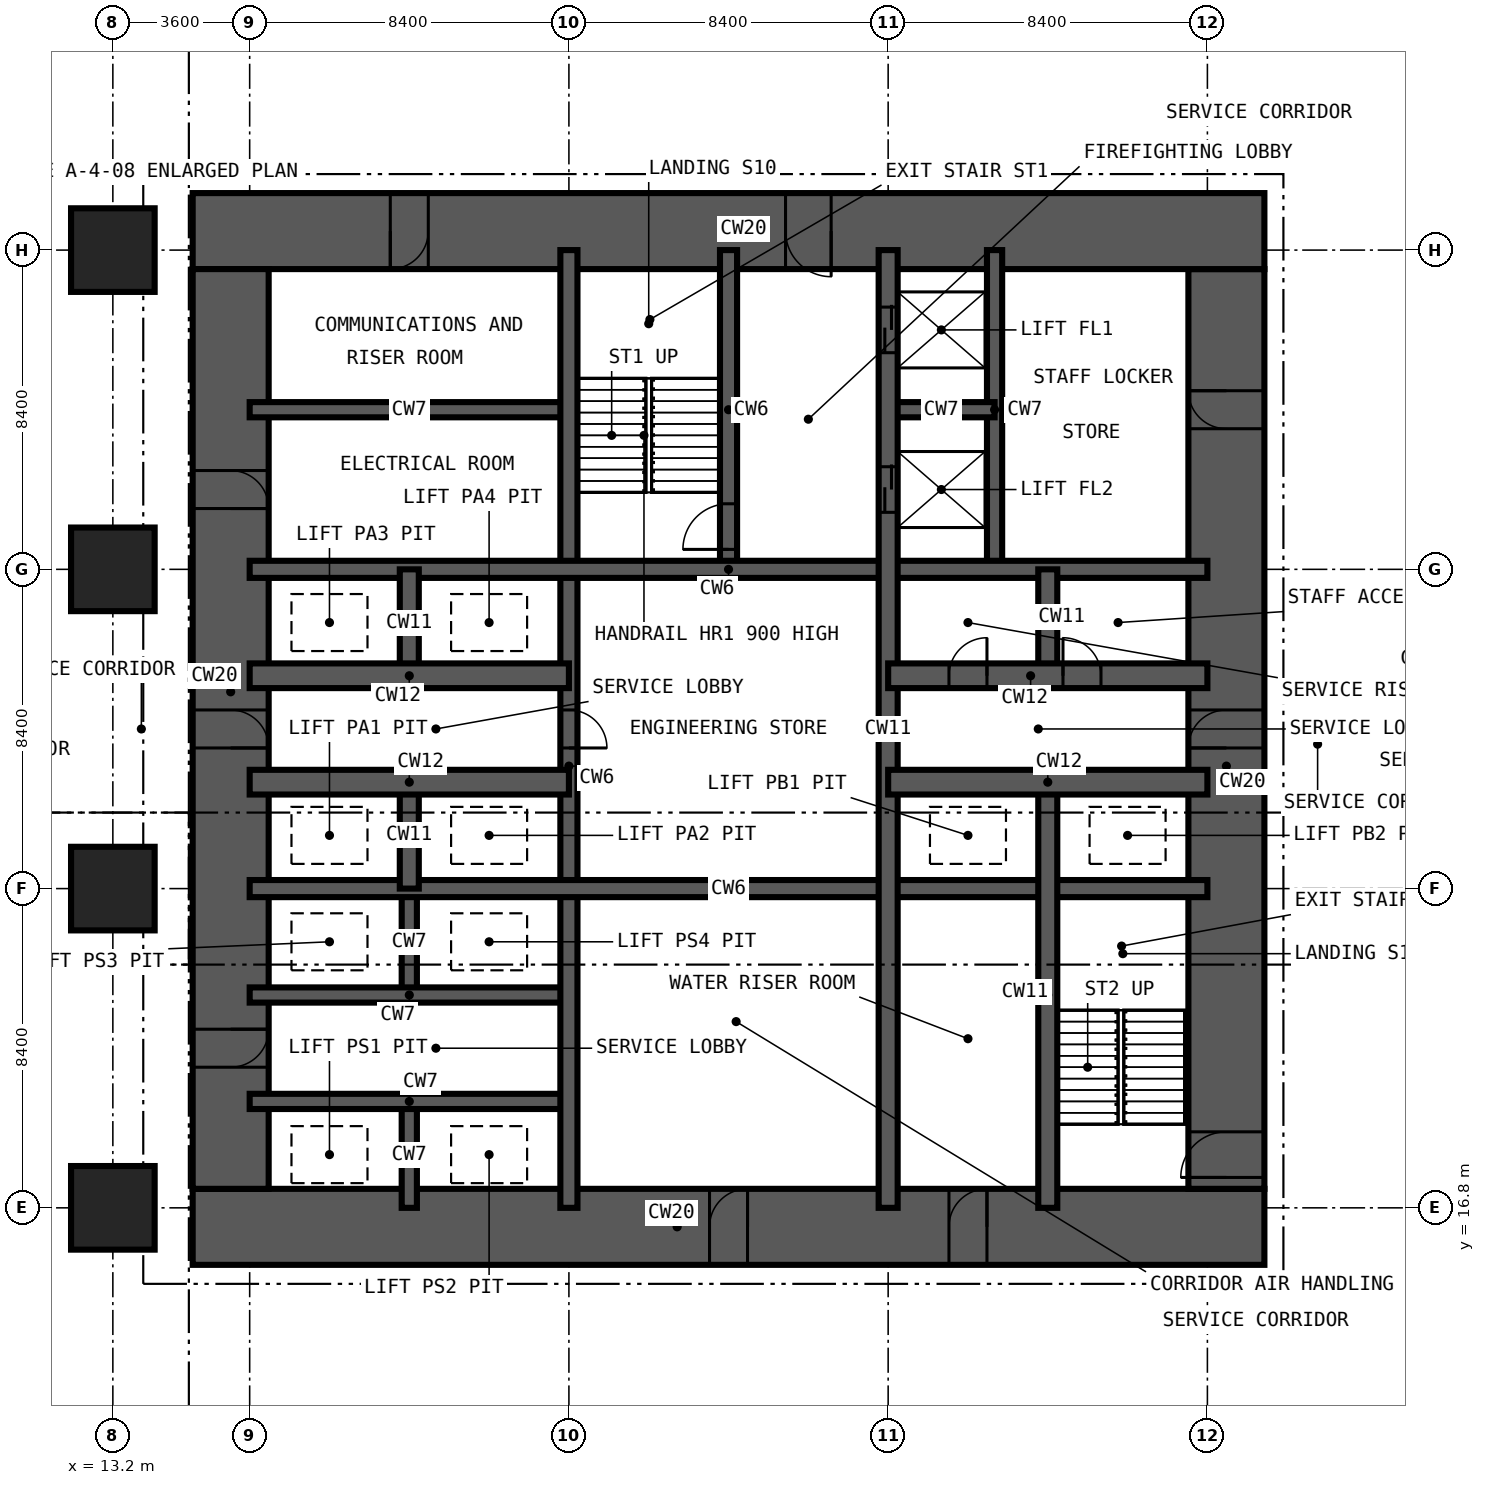
"""IFC4 building model, lengths in metres.
Left out: names, types, materials, properties, quantities, classifications, styles, units other than length and angle.
Written with IfcOpenShell. Run it as: python <this file> out.ifc"""

import sys

from ifc_helpers import new_model, si_unit, direction, frame, frame_2d, origin, origin_2d, place, context, subcontext, project, spatial, rectangle, extrude, element, fill, save


model = new_model("IFC4")
c1 = context("Model", 3, precision=1e-05, world=origin(), true_north=direction((0.0, 1.0)))
c2 = subcontext(c1, "Body", "Model", "MODEL_VIEW")
j1 = project(units=[si_unit("LENGTHUNIT", "METRE"), si_unit("PLANEANGLEUNIT", "RADIAN")], contexts=[c1])
p1 = place(None, origin())
s1 = spatial("IfcSite", under=j1, at=p1, CompositionType="ELEMENT")
p2 = place(p1, origin())
s2 = spatial("IfcBuilding", under=s1, at=p2, CompositionType="ELEMENT")
p3 = place(p2, frame((0.0, 0.0, -5.4)))
s3 = spatial("IfcBuildingStorey", under=s2, at=p3, CompositionType="ELEMENT", Elevation=-5.4)
for number, where, z_axis, x_axis in (
    (1, (13.2, 16.8, 0.0), (0.0, 0.0, 1.0), (1.0, 0.0, 0.0)),
    (2, (13.2, 25.2, 0.0), (0.0, 0.0, 1.0), (1.0, 0.0, 0.0)),
    (3, (13.2, 33.6, 0.0), (0.0, 0.0, 1.0), (1.0, 0.0, 0.0)),
    (4, (13.2, 42.0, 0.0), (0.0, 0.0, 1.0), (1.0, 0.0, 0.0)),
):
    element("IfcColumn", number, at=place(p3, frame(where, z_axis=z_axis, x_axis=x_axis)), inside=s3, PredefinedType="COLUMN", context=c2, shape_type="SweptSolid", body=[
        extrude(rectangle(XDim=2.2, YDim=2.2, at=origin_2d()), origin(), (0.0, 0.0, 1.0), 5.1),
    ])
p4 = place(p3, frame((15.3, 16.3, 0.0), z_axis=(0.0, 0.0, 1.0), x_axis=(1.0, 0.0, 0.0)))
e5 = element("IfcWall", 5, at=p4, inside=s3, PredefinedType="SHEAR", context=c2, shape_type="SweptSolid", body=[
    extrude(rectangle(XDim=28.2, YDim=2.0, at=frame_2d((14.1, 0.0))), origin(), (0.0, 0.0, 1.0), 5.1),
])
p5 = place(p4, frame((13.6, 0.0, 0.0)))
e6 = element("IfcOpeningElement", 6, at=p5, cuts=e5, PredefinedType="OPENING", context=c2, shape_type="SweptSolid", body=[
    extrude(rectangle(XDim=1.0, YDim=2.1, at=frame_2d((0.5, 1.05))), frame((0.0, 1.01, 0.0), z_axis=(0.0, -1.0, 0.0), x_axis=(1.0, 0.0, 0.0)), (0.0, 0.0, 1.0), 2.02),
])
p6 = place(p4, frame((19.9, 0.0, 0.0)))
e7 = element("IfcOpeningElement", 7, at=p6, cuts=e5, PredefinedType="OPENING", context=c2, shape_type="SweptSolid", body=[
    extrude(rectangle(XDim=1.0, YDim=2.1, at=frame_2d((0.5, 1.05))), frame((0.0, 1.01, 0.0), z_axis=(0.0, -1.0, 0.0), x_axis=(1.0, 0.0, 0.0)), (0.0, 0.0, 1.0), 2.02),
])
p7 = place(p3, frame((42.5, 17.3, 0.0), z_axis=(0.0, 0.0, 1.0), x_axis=(0.0, 1.0, 0.0)))
e8 = element("IfcWall", 8, at=p7, inside=s3, PredefinedType="SHEAR", context=c2, shape_type="SweptSolid", body=[
    extrude(rectangle(XDim=24.2, YDim=2.0, at=frame_2d((12.1, 0.0))), origin(), (0.0, 0.0, 1.0), 5.1),
])
p8 = place(p7, frame((0.3, 0.0, 0.0)))
e9 = element("IfcOpeningElement", 9, at=p8, cuts=e8, PredefinedType="OPENING", context=c2, shape_type="SweptSolid", body=[
    extrude(rectangle(XDim=1.2, YDim=2.2, at=frame_2d((0.6, 1.1))), frame((0.0, 1.01, 0.0), z_axis=(0.0, -1.0, 0.0), x_axis=(1.0, 0.0, 0.0)), (0.0, 0.0, 1.0), 2.02),
])
p9 = place(p7, frame((11.6, 0.0, 0.0)))
e10 = element("IfcOpeningElement", 10, at=p9, cuts=e8, PredefinedType="OPENING", context=c2, shape_type="SweptSolid", body=[
    extrude(rectangle(XDim=1.0, YDim=2.1, at=frame_2d((0.5, 1.05))), frame((0.0, 1.01, 0.0), z_axis=(0.0, -1.0, 0.0), x_axis=(1.0, 0.0, 0.0)), (0.0, 0.0, 1.0), 2.02),
])
p10 = place(p7, frame((20.0, 0.0, 0.0)))
e11 = element("IfcOpeningElement", 11, at=p10, cuts=e8, PredefinedType="OPENING", context=c2, shape_type="SweptSolid", body=[
    extrude(rectangle(XDim=1.0, YDim=2.1, at=frame_2d((0.5, 1.05))), frame((0.0, 1.01, 0.0), z_axis=(0.0, -1.0, 0.0), x_axis=(1.0, 0.0, 0.0)), (0.0, 0.0, 1.0), 2.02),
])
p11 = place(p3, frame((43.5, 42.5, 0.0), z_axis=(0.0, 0.0, 1.0), x_axis=(-1.0, 0.0, 0.0)))
e12 = element("IfcWall", 12, at=p11, inside=s3, PredefinedType="SHEAR", context=c2, shape_type="SweptSolid", body=[
    extrude(rectangle(XDim=28.2, YDim=2.0, at=frame_2d((14.1, 0.0))), origin(), (0.0, 0.0, 1.0), 5.1),
])
p12 = place(p11, frame((22.0, 0.0, 0.0)))
e13 = element("IfcOpeningElement", 13, at=p12, cuts=e12, PredefinedType="OPENING", context=c2, shape_type="SweptSolid", body=[
    extrude(rectangle(XDim=1.0, YDim=2.1, at=frame_2d((0.5, 1.05))), frame((0.0, 1.01, 0.0), z_axis=(0.0, -1.0, 0.0), x_axis=(1.0, 0.0, 0.0)), (0.0, 0.0, 1.0), 2.02),
])
p13 = place(p11, frame((11.4, 0.0, 0.0)))
e14 = element("IfcOpeningElement", 14, at=p13, cuts=e12, PredefinedType="OPENING", context=c2, shape_type="SweptSolid", body=[
    extrude(rectangle(XDim=1.2, YDim=2.2, at=frame_2d((0.6, 1.1))), frame((0.0, 1.01, 0.0), z_axis=(0.0, -1.0, 0.0), x_axis=(1.0, 0.0, 0.0)), (0.0, 0.0, 1.0), 2.02),
])
p14 = place(p3, frame((16.3, 41.5, 0.0), z_axis=(0.0, 0.0, 1.0), x_axis=(0.0, -1.0, 0.0)))
e15 = element("IfcWall", 15, at=p14, inside=s3, PredefinedType="SHEAR", context=c2, shape_type="SweptSolid", body=[
    extrude(rectangle(XDim=24.2, YDim=2.0, at=frame_2d((12.1, 0.0))), origin(), (0.0, 0.0, 1.0), 5.1),
])
p15 = place(p14, frame((11.6, 0.0, 0.0)))
e16 = element("IfcOpeningElement", 16, at=p15, cuts=e15, PredefinedType="OPENING", context=c2, shape_type="SweptSolid", body=[
    extrude(rectangle(XDim=1.0, YDim=2.1, at=frame_2d((0.5, 1.05))), frame((0.0, 1.01, 0.0), z_axis=(0.0, -1.0, 0.0), x_axis=(1.0, 0.0, 0.0)), (0.0, 0.0, 1.0), 2.02),
])
p16 = place(p14, frame((20.0, 0.0, 0.0)))
e17 = element("IfcOpeningElement", 17, at=p16, cuts=e15, PredefinedType="OPENING", context=c2, shape_type="SweptSolid", body=[
    extrude(rectangle(XDim=1.0, YDim=2.1, at=frame_2d((0.5, 1.05))), frame((0.0, 1.01, 0.0), z_axis=(0.0, -1.0, 0.0), x_axis=(1.0, 0.0, 0.0)), (0.0, 0.0, 1.0), 2.02),
])
p17 = place(p14, frame((5.3, 0.0, 0.0)))
e18 = element("IfcOpeningElement", 18, at=p17, cuts=e15, PredefinedType="OPENING", context=c2, shape_type="SweptSolid", body=[
    extrude(rectangle(XDim=1.0, YDim=2.1, at=frame_2d((0.5, 1.05))), frame((0.0, 1.01, 0.0), z_axis=(0.0, -1.0, 0.0), x_axis=(1.0, 0.0, 0.0)), (0.0, 0.0, 1.0), 2.02),
])
for number, where, z_axis, x_axis in (
    (19, (21.0, 16.8, 0.0), (0.0, 0.0, 1.0), (0.0, 1.0, 0.0)),
    (20, (21.0, 22.4, 0.0), (0.0, 0.0, 1.0), (0.0, 1.0, 0.0)),
):
    element("IfcWall", number, at=place(p3, frame(where, z_axis=z_axis, x_axis=x_axis)), inside=s3, PredefinedType="SHEAR", context=c2, shape_type="SweptSolid", body=[
        extrude(rectangle(XDim=2.8, YDim=0.4, at=frame_2d((1.4, 0.0))), origin(), (0.0, 0.0, 1.0), 5.1),
    ])
for number, where, z_axis, x_axis in (
    (21, (36.4, 33.6, 0.0), (0.0, 0.0, 1.0), (0.0, 1.0, 0.0)),
    (22, (16.8, 19.6, 0.0), (0.0, 0.0, 1.0), (1.0, 0.0, 0.0)),
    (23, (16.8, 22.4, 0.0), (0.0, 0.0, 1.0), (1.0, 0.0, 0.0)),
    (24, (16.8, 37.8, 0.0), (0.0, 0.0, 1.0), (1.0, 0.0, 0.0)),
):
    element("IfcWall", number, at=place(p3, frame(where, z_axis=z_axis, x_axis=x_axis)), inside=s3, PredefinedType="SHEAR", context=c2, shape_type="SweptSolid", body=[
        extrude(rectangle(XDim=8.4, YDim=0.4, at=frame_2d((4.2, 0.0))), origin(), (0.0, 0.0, 1.0), 5.1),
    ])
p18 = place(p3, frame((33.6, 37.8, 0.0), z_axis=(0.0, 0.0, 1.0), x_axis=(1.0, 0.0, 0.0)))
e25 = element("IfcWall", 25, at=p18, inside=s3, PredefinedType="SHEAR", context=c2, shape_type="SweptSolid", body=[
    extrude(rectangle(XDim=2.8, YDim=0.4, at=frame_2d((1.4, 0.0))), origin(), (0.0, 0.0, 1.0), 5.1),
])
p19 = place(p3, frame((25.2, 16.8, 0.0), z_axis=(0.0, 0.0, 1.0), x_axis=(0.0, 1.0, 0.0)))
e26 = element("IfcWall", 26, at=p19, inside=s3, PredefinedType="SHEAR", context=c2, shape_type="SweptSolid", body=[
    extrude(rectangle(XDim=25.2, YDim=0.45, at=frame_2d((12.6, 0.0))), origin(), (0.0, 0.0, 1.0), 5.1),
])
p20 = place(p19, frame((12.1, 0.0, 0.0)))
e27 = element("IfcOpeningElement", 27, at=p20, cuts=e26, PredefinedType="OPENING", context=c2, shape_type="SweptSolid", body=[
    extrude(rectangle(XDim=1.0, YDim=2.1, at=frame_2d((0.5, 1.05))), frame((0.0, 0.235, 0.0), z_axis=(0.0, -1.0, 0.0), x_axis=(1.0, 0.0, 0.0)), (0.0, 0.0, 1.0), 0.47),
])
p21 = place(p3, frame((29.4, 33.6, 0.0), z_axis=(0.0, 0.0, 1.0), x_axis=(0.0, 1.0, 0.0)))
e28 = element("IfcWall", 28, at=p21, inside=s3, PredefinedType="SHEAR", context=c2, shape_type="SweptSolid", body=[
    extrude(rectangle(XDim=8.4, YDim=0.45, at=frame_2d((4.2, 0.0))), origin(), (0.0, 0.0, 1.0), 5.1),
])
p22 = place(p21, frame((0.525, 0.0, 0.0)))
e29 = element("IfcOpeningElement", 29, at=p22, cuts=e28, PredefinedType="OPENING", context=c2, shape_type="SweptSolid", body=[
    extrude(rectangle(XDim=1.2, YDim=2.2, at=frame_2d((0.6, 1.1))), frame((0.0, 0.235, 0.0), z_axis=(0.0, -1.0, 0.0), x_axis=(1.0, 0.0, 0.0)), (0.0, 0.0, 1.0), 0.47),
])
for number, where, z_axis, x_axis in (
    (30, (16.8, 25.2, 0.0), (0.0, 0.0, 1.0), (1.0, 0.0, 0.0)),
    (31, (16.8, 33.6, 0.0), (0.0, 0.0, 1.0), (1.0, 0.0, 0.0)),
):
    element("IfcWall", number, at=place(p3, frame(where, z_axis=z_axis, x_axis=x_axis)), inside=s3, PredefinedType="SHEAR", context=c2, shape_type="SweptSolid", body=[
        extrude(rectangle(XDim=25.2, YDim=0.45, at=frame_2d((12.6, 0.0))), origin(), (0.0, 0.0, 1.0), 5.1),
    ])
for number, where, z_axis, x_axis in (
    (32, (21.0, 25.2, 0.0), (0.0, 0.0, 1.0), (0.0, 1.0, 0.0)),
    (33, (21.0, 30.8, 0.0), (0.0, 0.0, 1.0), (0.0, 1.0, 0.0)),
):
    element("IfcWall", number, at=place(p3, frame(where, z_axis=z_axis, x_axis=x_axis)), inside=s3, PredefinedType="SHEAR", context=c2, shape_type="SweptSolid", body=[
        extrude(rectangle(XDim=2.8, YDim=0.5, at=frame_2d((1.4, 0.0))), origin(), (0.0, 0.0, 1.0), 5.1),
    ])
p23 = place(p3, frame((33.6, 16.8, 0.0), z_axis=(0.0, 0.0, 1.0), x_axis=(0.0, 1.0, 0.0)))
e34 = element("IfcWall", 34, at=p23, inside=s3, PredefinedType="SHEAR", context=c2, shape_type="SweptSolid", body=[
    extrude(rectangle(XDim=25.2, YDim=0.5, at=frame_2d((12.6, 0.0))), origin(), (0.0, 0.0, 1.0), 5.1),
])
p24 = place(p23, frame((22.5, 0.0, 0.0)))
e35 = element("IfcOpeningElement", 35, at=p24, cuts=e34, PredefinedType="OPENING", context=c2, shape_type="SweptSolid", body=[
    extrude(rectangle(XDim=1.2, YDim=2.2, at=frame_2d((0.6, 1.1))), frame((0.0, 0.26, 0.0), z_axis=(0.0, -1.0, 0.0), x_axis=(1.0, 0.0, 0.0)), (0.0, 0.0, 1.0), 0.52),
])
p25 = place(p23, frame((18.3, 0.0, 0.0)))
e36 = element("IfcOpeningElement", 36, at=p25, cuts=e34, PredefinedType="OPENING", context=c2, shape_type="SweptSolid", body=[
    extrude(rectangle(XDim=1.2, YDim=2.2, at=frame_2d((0.6, 1.1))), frame((0.0, 0.26, 0.0), z_axis=(0.0, -1.0, 0.0), x_axis=(1.0, 0.0, 0.0)), (0.0, 0.0, 1.0), 0.52),
])
p26 = place(p3, frame((37.8, 16.8, 0.0), z_axis=(0.0, 0.0, 1.0), x_axis=(0.0, 1.0, 0.0)))
e37 = element("IfcWall", 37, at=p26, inside=s3, PredefinedType="SHEAR", context=c2, shape_type="SweptSolid", body=[
    extrude(rectangle(XDim=11.2, YDim=0.5, at=frame_2d((5.6, 0.0))), origin(), (0.0, 0.0, 1.0), 5.1),
])
p27 = place(p3, frame((37.8, 30.8, 0.0), z_axis=(0.0, 0.0, 1.0), x_axis=(0.0, 1.0, 0.0)))
e38 = element("IfcWall", 38, at=p27, inside=s3, PredefinedType="SHEAR", context=c2, shape_type="SweptSolid", body=[
    extrude(rectangle(XDim=2.8, YDim=0.5, at=frame_2d((1.4, 0.0))), origin(), (0.0, 0.0, 1.0), 5.1),
])
for number, where, z_axis, x_axis in (
    (39, (16.8, 28.0, 0.0), (0.0, 0.0, 1.0), (1.0, 0.0, 0.0)),
    (40, (33.6, 28.0, 0.0), (0.0, 0.0, 1.0), (1.0, 0.0, 0.0)),
    (41, (16.8, 30.8, 0.0), (0.0, 0.0, 1.0), (1.0, 0.0, 0.0)),
):
    element("IfcWall", number, at=place(p3, frame(where, z_axis=z_axis, x_axis=x_axis)), inside=s3, PredefinedType="SHEAR", context=c2, shape_type="SweptSolid", body=[
        extrude(rectangle(XDim=8.4, YDim=0.65, at=frame_2d((4.2, 0.0))), origin(), (0.0, 0.0, 1.0), 5.1),
    ])
p28 = place(p3, frame((33.6, 30.8, 0.0), z_axis=(0.0, 0.0, 1.0), x_axis=(1.0, 0.0, 0.0)))
e42 = element("IfcWall", 42, at=p28, inside=s3, PredefinedType="SHEAR", context=c2, shape_type="SweptSolid", body=[
    extrude(rectangle(XDim=8.4, YDim=0.65, at=frame_2d((4.2, 0.0))), origin(), (0.0, 0.0, 1.0), 5.1),
])
p29 = place(p28, frame((1.6, 0.0, 0.0)))
e43 = element("IfcOpeningElement", 43, at=p29, cuts=e42, PredefinedType="OPENING", context=c2, shape_type="SweptSolid", body=[
    extrude(rectangle(XDim=1.0, YDim=2.1, at=frame_2d((0.5, 1.05))), frame((0.0, 0.335, 0.0), z_axis=(0.0, -1.0, 0.0), x_axis=(1.0, 0.0, 0.0)), (0.0, 0.0, 1.0), 0.67),
])
p30 = place(p28, frame((4.6, 0.0, 0.0)))
e44 = element("IfcOpeningElement", 44, at=p30, cuts=e42, PredefinedType="OPENING", context=c2, shape_type="SweptSolid", body=[
    extrude(rectangle(XDim=1.0, YDim=2.1, at=frame_2d((0.5, 1.05))), frame((0.0, 0.335, 0.0), z_axis=(0.0, -1.0, 0.0), x_axis=(1.0, 0.0, 0.0)), (0.0, 0.0, 1.0), 0.67),
])
p31 = place(p22, origin())
e45 = element("IfcDoor", 45, at=p31, inside=s3, OperationType="SINGLE_SWING_LEFT", PredefinedType="DOOR", context=c2, shape_type="SweptSolid", body=[
    extrude(rectangle(XDim=1.2, YDim=2.2, at=frame_2d((0.6, 1.1))), frame((0.0, 0.025, 0.0), z_axis=(0.0, -1.0, 0.0), x_axis=(1.0, 0.0, 0.0)), (0.0, 0.0, 1.0), 0.05),
])
fill(e29, e45)
p32 = place(p8, origin())
e46 = element("IfcDoor", 46, at=p32, inside=s3, OperationType="SINGLE_SWING_LEFT", PredefinedType="DOOR", context=c2, shape_type="SweptSolid", body=[
    extrude(rectangle(XDim=1.2, YDim=2.2, at=frame_2d((0.6, 1.1))), frame((0.0, 0.025, 0.0), z_axis=(0.0, -1.0, 0.0), x_axis=(1.0, 0.0, 0.0)), (0.0, 0.0, 1.0), 0.05),
])
fill(e9, e46)
p33 = place(p24, origin())
e47 = element("IfcDoor", 47, at=p33, inside=s3, OperationType="DOUBLE_DOOR_SLIDING", PredefinedType="DOOR", context=c2, shape_type="SweptSolid", body=[
    extrude(rectangle(XDim=1.2, YDim=2.2, at=frame_2d((0.6, 1.1))), frame((0.0, 0.025, 0.0), z_axis=(0.0, -1.0, 0.0), x_axis=(1.0, 0.0, 0.0)), (0.0, 0.0, 1.0), 0.05),
])
fill(e35, e47)
p34 = place(p25, origin())
e48 = element("IfcDoor", 48, at=p34, inside=s3, OperationType="DOUBLE_DOOR_SLIDING", PredefinedType="DOOR", context=c2, shape_type="SweptSolid", body=[
    extrude(rectangle(XDim=1.2, YDim=2.2, at=frame_2d((0.6, 1.1))), frame((0.0, 0.025, 0.0), z_axis=(0.0, -1.0, 0.0), x_axis=(1.0, 0.0, 0.0)), (0.0, 0.0, 1.0), 0.05),
])
fill(e36, e48)
p35 = place(p15, origin())
e49 = element("IfcDoor", 49, at=p35, inside=s3, OperationType="SINGLE_SWING_RIGHT", PredefinedType="DOOR", context=c2, shape_type="SweptSolid", body=[
    extrude(rectangle(XDim=1.0, YDim=2.1, at=frame_2d((0.5, 1.05))), frame((0.0, 0.025, 0.0), z_axis=(0.0, -1.0, 0.0), x_axis=(1.0, 0.0, 0.0)), (0.0, 0.0, 1.0), 0.05),
])
fill(e16, e49)
p36 = place(p16, origin())
e50 = element("IfcDoor", 50, at=p36, inside=s3, OperationType="SINGLE_SWING_LEFT", PredefinedType="DOOR", context=c2, shape_type="SweptSolid", body=[
    extrude(rectangle(XDim=1.0, YDim=2.1, at=frame_2d((0.5, 1.05))), frame((0.0, 0.025, 0.0), z_axis=(0.0, -1.0, 0.0), x_axis=(1.0, 0.0, 0.0)), (0.0, 0.0, 1.0), 0.05),
])
fill(e17, e50)
p37 = place(p17, origin())
e51 = element("IfcDoor", 51, at=p37, inside=s3, OperationType="SINGLE_SWING_RIGHT", PredefinedType="DOOR", context=c2, shape_type="SweptSolid", body=[
    extrude(rectangle(XDim=1.0, YDim=2.1, at=frame_2d((0.5, 1.05))), frame((0.0, 0.025, 0.0), z_axis=(0.0, -1.0, 0.0), x_axis=(1.0, 0.0, 0.0)), (0.0, 0.0, 1.0), 0.05),
])
fill(e18, e51)
p38 = place(p12, origin())
e52 = element("IfcDoor", 52, at=p38, inside=s3, OperationType="SINGLE_SWING_RIGHT", PredefinedType="DOOR", context=c2, shape_type="SweptSolid", body=[
    extrude(rectangle(XDim=1.0, YDim=2.1, at=frame_2d((0.5, 1.05))), frame((0.0, 0.025, 0.0), z_axis=(0.0, -1.0, 0.0), x_axis=(1.0, 0.0, 0.0)), (0.0, 0.0, 1.0), 0.05),
])
fill(e13, e52)
p39 = place(p20, frame((1.0, 0.0, 0.0), z_axis=(0.0, 0.0, 1.0), x_axis=(-1.0, 0.0, 0.0)))
e53 = element("IfcDoor", 53, at=p39, inside=s3, OperationType="SINGLE_SWING_RIGHT", PredefinedType="DOOR", context=c2, shape_type="SweptSolid", body=[
    extrude(rectangle(XDim=1.0, YDim=2.1, at=frame_2d((0.5, 1.05))), frame((0.0, 0.025, 0.0), z_axis=(0.0, -1.0, 0.0), x_axis=(1.0, 0.0, 0.0)), (0.0, 0.0, 1.0), 0.05),
])
fill(e27, e53)
p40 = place(p29, origin())
e54 = element("IfcDoor", 54, at=p40, inside=s3, OperationType="SINGLE_SWING_RIGHT", PredefinedType="DOOR", context=c2, shape_type="SweptSolid", body=[
    extrude(rectangle(XDim=1.0, YDim=2.1, at=frame_2d((0.5, 1.05))), frame((0.0, 0.025, 0.0), z_axis=(0.0, -1.0, 0.0), x_axis=(1.0, 0.0, 0.0)), (0.0, 0.0, 1.0), 0.05),
])
fill(e43, e54)
p41 = place(p30, origin())
e55 = element("IfcDoor", 55, at=p41, inside=s3, OperationType="SINGLE_SWING_LEFT", PredefinedType="DOOR", context=c2, shape_type="SweptSolid", body=[
    extrude(rectangle(XDim=1.0, YDim=2.1, at=frame_2d((0.5, 1.05))), frame((0.0, 0.025, 0.0), z_axis=(0.0, -1.0, 0.0), x_axis=(1.0, 0.0, 0.0)), (0.0, 0.0, 1.0), 0.05),
])
fill(e44, e55)
p42 = place(p9, origin())
e56 = element("IfcDoor", 56, at=p42, inside=s3, OperationType="SINGLE_SWING_LEFT", PredefinedType="DOOR", context=c2, shape_type="SweptSolid", body=[
    extrude(rectangle(XDim=1.0, YDim=2.1, at=frame_2d((0.5, 1.05))), frame((0.0, 0.025, 0.0), z_axis=(0.0, -1.0, 0.0), x_axis=(1.0, 0.0, 0.0)), (0.0, 0.0, 1.0), 0.05),
])
fill(e10, e56)
p43 = place(p13, origin())
e57 = element("IfcDoor", 57, at=p43, inside=s3, OperationType="SINGLE_SWING_LEFT", PredefinedType="DOOR", context=c2, shape_type="SweptSolid", body=[
    extrude(rectangle(XDim=1.2, YDim=2.2, at=frame_2d((0.6, 1.1))), frame((0.0, 0.025, 0.0), z_axis=(0.0, -1.0, 0.0), x_axis=(1.0, 0.0, 0.0)), (0.0, 0.0, 1.0), 0.05),
])
fill(e14, e57)
p44 = place(p10, origin())
e58 = element("IfcDoor", 58, at=p44, inside=s3, OperationType="SINGLE_SWING_RIGHT", PredefinedType="DOOR", context=c2, shape_type="SweptSolid", body=[
    extrude(rectangle(XDim=1.0, YDim=2.1, at=frame_2d((0.5, 1.05))), frame((0.0, 0.025, 0.0), z_axis=(0.0, -1.0, 0.0), x_axis=(1.0, 0.0, 0.0)), (0.0, 0.0, 1.0), 0.05),
])
fill(e11, e58)
p45 = place(p5, origin())
e59 = element("IfcDoor", 59, at=p45, inside=s3, OperationType="SINGLE_SWING_RIGHT", PredefinedType="DOOR", context=c2, shape_type="SweptSolid", body=[
    extrude(rectangle(XDim=1.0, YDim=2.1, at=frame_2d((0.5, 1.05))), frame((0.0, 0.025, 0.0), z_axis=(0.0, -1.0, 0.0), x_axis=(1.0, 0.0, 0.0)), (0.0, 0.0, 1.0), 0.05),
])
fill(e6, e59)
p46 = place(p6, origin())
e60 = element("IfcDoor", 60, at=p46, inside=s3, OperationType="SINGLE_SWING_RIGHT", PredefinedType="DOOR", context=c2, shape_type="SweptSolid", body=[
    extrude(rectangle(XDim=1.0, YDim=2.1, at=frame_2d((0.5, 1.05))), frame((0.0, 0.025, 0.0), z_axis=(0.0, -1.0, 0.0), x_axis=(1.0, 0.0, 0.0)), (0.0, 0.0, 1.0), 0.05),
])
fill(e7, e60)
save(model, sys.argv[1])
